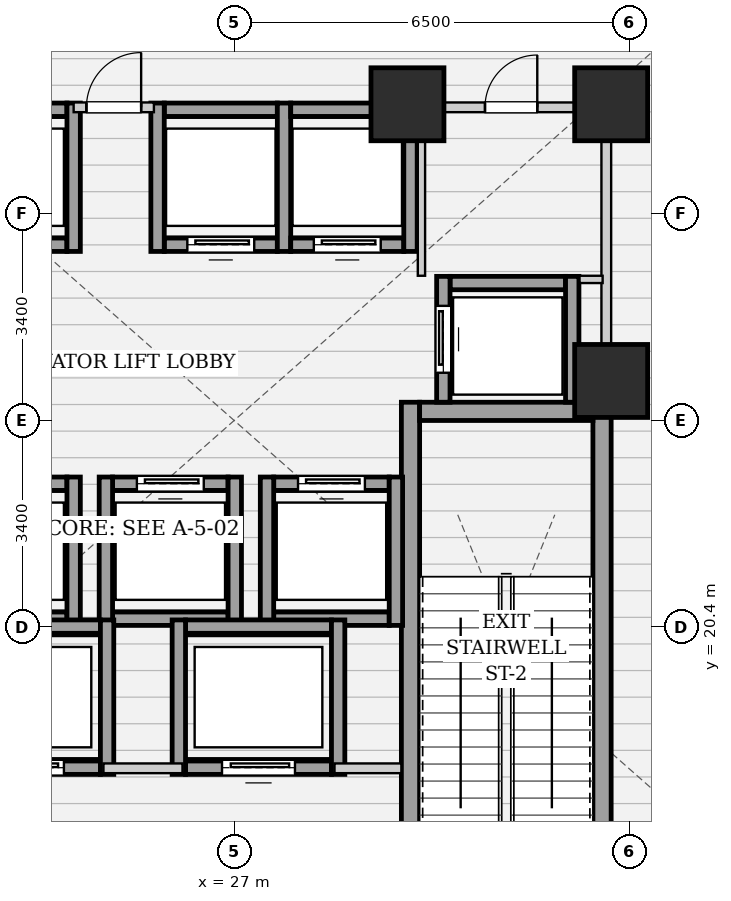
"""IFC4 building model, lengths in metres.
Left out: names, types, materials, properties, quantities, classifications, styles, units other than length and angle.
Written with IfcOpenShell. Run it as: python <this file> out.ifc"""

import sys

from ifc_helpers import new_model, si_unit, direction, frame, frame_2d, origin, origin_2d, place, context, subcontext, project, spatial, rectangle, extrude, element, fill, save


model = new_model("IFC4")
c1 = context("Model", 3, precision=1e-05, world=origin(), true_north=direction((0.0, 1.0)))
c2 = subcontext(c1, "Body", "Model", "MODEL_VIEW")
j1 = project(units=[si_unit("LENGTHUNIT", "METRE"), si_unit("PLANEANGLEUNIT", "RADIAN")], contexts=[c1])
p1 = place(None, origin())
s1 = spatial("IfcSite", under=j1, at=p1, CompositionType="ELEMENT")
p2 = place(p1, origin())
s2 = spatial("IfcBuilding", under=s1, at=p2, CompositionType="ELEMENT")
p3 = place(p2, origin())
s3 = spatial("IfcBuildingStorey", under=s2, at=p3, CompositionType="ELEMENT", Elevation=0.0)
for number, where, z_axis, x_axis in (
    (1, (29.85, 29.0, 0.0), (0.0, 0.0, 1.0), (1.0, 0.0, 0.0)),
    (2, (33.2, 29.0, 0.0), (0.0, 0.0, 1.0), (1.0, 0.0, 0.0)),
    (3, (33.2, 24.45, 0.0), (0.0, 0.0, 1.0), (1.0, 0.0, 0.0)),
):
    element("IfcColumn", number, at=place(p3, frame(where, z_axis=z_axis, x_axis=x_axis)), inside=s3, PredefinedType="COLUMN", context=c2, shape_type="SweptSolid", body=[
        extrude(rectangle(XDim=1.2, YDim=1.2, at=origin_2d()), origin(), (0.0, 0.0, 1.0), 6.0),
    ])
for number, where, z_axis, x_axis in (
    (4, (29.9, 15.1, 0.0), (0.0, 0.0, 1.0), (0.0, 1.0, 0.0)),
    (5, (33.05, 15.1, 0.0), (0.0, 0.0, 1.0), (0.0, 1.0, 0.0)),
):
    element("IfcWall", number, at=place(p3, frame(where, z_axis=z_axis, x_axis=x_axis)), inside=s3, PredefinedType="SHEAR", context=c2, shape_type="SweptSolid", body=[
        extrude(rectangle(XDim=9.0, YDim=0.3, at=frame_2d((4.5, 0.0))), origin(), (0.0, 0.0, 1.0), 5.68),
    ])
p4 = place(p3, frame((30.05, 23.95, 0.0), z_axis=(0.0, 0.0, 1.0), x_axis=(1.0, 0.0, 0.0)))
e6 = element("IfcWall", 6, at=p4, inside=s3, PredefinedType="SHEAR", context=c2, shape_type="SweptSolid", body=[
    extrude(rectangle(XDim=2.85, YDim=0.3, at=frame_2d((1.425, 0.0))), origin(), (0.0, 0.0, 1.0), 5.68),
])
p5 = place(p3, frame((22.35, 26.69, 0.0), z_axis=(0.0, 0.0, 1.0), x_axis=(1.0, 0.0, 0.0)))
e7 = element("IfcWall", 7, at=p5, inside=s3, PredefinedType="SHEAR", context=c2, shape_type="SweptSolid", body=[
    extrude(rectangle(XDim=1.9, YDim=0.22, at=frame_2d((0.95, 0.0))), origin(), (0.0, 0.0, 1.0), 5.68),
])
p6 = place(p5, frame((0.4, 0.0, 0.0)))
e8 = element("IfcOpeningElement", 8, at=p6, cuts=e7, PredefinedType="OPENING", context=c2, shape_type="SweptSolid", body=[
    extrude(rectangle(XDim=1.1, YDim=2.15, at=frame_2d((0.55, 1.075))), frame((0.0, 0.12, 0.0), z_axis=(0.0, -1.0, 0.0), x_axis=(1.0, 0.0, 0.0)), (0.0, 0.0, 1.0), 0.24),
])
p7 = place(p3, frame((22.35, 28.91, 0.0), z_axis=(0.0, 0.0, 1.0), x_axis=(1.0, 0.0, 0.0)))
e9 = element("IfcWall", 9, at=p7, inside=s3, PredefinedType="SHEAR", context=c2, shape_type="SweptSolid", body=[
    extrude(rectangle(XDim=1.9, YDim=0.22, at=frame_2d((0.95, 0.0))), origin(), (0.0, 0.0, 1.0), 5.68),
])
p8 = place(p3, frame((24.36, 26.58, 0.0), z_axis=(0.0, 0.0, 1.0), x_axis=(0.0, 1.0, 0.0)))
e10 = element("IfcWall", 10, at=p8, inside=s3, PredefinedType="SHEAR", context=c2, shape_type="SweptSolid", body=[
    extrude(rectangle(XDim=2.44, YDim=0.22, at=frame_2d((1.22, 0.0))), origin(), (0.0, 0.0, 1.0), 5.68),
])
p9 = place(p3, frame((25.85, 26.69, 0.0), z_axis=(0.0, 0.0, 1.0), x_axis=(1.0, 0.0, 0.0)))
e11 = element("IfcWall", 11, at=p9, inside=s3, PredefinedType="SHEAR", context=c2, shape_type="SweptSolid", body=[
    extrude(rectangle(XDim=1.86, YDim=0.22, at=frame_2d((0.93, 0.0))), origin(), (0.0, 0.0, 1.0), 5.68),
])
p10 = place(p9, frame((0.38, 0.0, 0.0)))
e12 = element("IfcOpeningElement", 12, at=p10, cuts=e11, PredefinedType="OPENING", context=c2, shape_type="SweptSolid", body=[
    extrude(rectangle(XDim=1.1, YDim=2.15, at=frame_2d((0.55, 1.075))), frame((0.0, 0.12, 0.0), z_axis=(0.0, -1.0, 0.0), x_axis=(1.0, 0.0, 0.0)), (0.0, 0.0, 1.0), 0.24),
])
p11 = place(p3, frame((25.85, 28.91, 0.0), z_axis=(0.0, 0.0, 1.0), x_axis=(1.0, 0.0, 0.0)))
e13 = element("IfcWall", 13, at=p11, inside=s3, PredefinedType="SHEAR", context=c2, shape_type="SweptSolid", body=[
    extrude(rectangle(XDim=1.86, YDim=0.22, at=frame_2d((0.93, 0.0))), origin(), (0.0, 0.0, 1.0), 5.68),
])
for number, where, z_axis, x_axis in (
    (14, (25.74, 26.58, 0.0), (0.0, 0.0, 1.0), (0.0, 1.0, 0.0)),
    (15, (27.82, 26.58, 0.0), (0.0, 0.0, 1.0), (0.0, 1.0, 0.0)),
):
    element("IfcWall", number, at=place(p3, frame(where, z_axis=z_axis, x_axis=x_axis)), inside=s3, PredefinedType="SHEAR", context=c2, shape_type="SweptSolid", body=[
        extrude(rectangle(XDim=2.44, YDim=0.22, at=frame_2d((1.22, 0.0))), origin(), (0.0, 0.0, 1.0), 5.68),
    ])
p12 = place(p3, frame((27.93, 26.69, 0.0), z_axis=(0.0, 0.0, 1.0), x_axis=(1.0, 0.0, 0.0)))
e16 = element("IfcWall", 16, at=p12, inside=s3, PredefinedType="SHEAR", context=c2, shape_type="SweptSolid", body=[
    extrude(rectangle(XDim=1.86, YDim=0.22, at=frame_2d((0.93, 0.0))), origin(), (0.0, 0.0, 1.0), 5.68),
])
p13 = place(p12, frame((0.38, 0.0, 0.0)))
e17 = element("IfcOpeningElement", 17, at=p13, cuts=e16, PredefinedType="OPENING", context=c2, shape_type="SweptSolid", body=[
    extrude(rectangle(XDim=1.1, YDim=2.15, at=frame_2d((0.55, 1.075))), frame((0.0, 0.12, 0.0), z_axis=(0.0, -1.0, 0.0), x_axis=(1.0, 0.0, 0.0)), (0.0, 0.0, 1.0), 0.24),
])
p14 = place(p3, frame((27.93, 28.91, 0.0), z_axis=(0.0, 0.0, 1.0), x_axis=(1.0, 0.0, 0.0)))
e18 = element("IfcWall", 18, at=p14, inside=s3, PredefinedType="SHEAR", context=c2, shape_type="SweptSolid", body=[
    extrude(rectangle(XDim=1.86, YDim=0.22, at=frame_2d((0.93, 0.0))), origin(), (0.0, 0.0, 1.0), 5.68),
])
p15 = place(p3, frame((29.9, 26.58, 0.0), z_axis=(0.0, 0.0, 1.0), x_axis=(0.0, 1.0, 0.0)))
e19 = element("IfcWall", 19, at=p15, inside=s3, PredefinedType="SHEAR", context=c2, shape_type="SweptSolid", body=[
    extrude(rectangle(XDim=2.44, YDim=0.22, at=frame_2d((1.22, 0.0))), origin(), (0.0, 0.0, 1.0), 5.68),
])
p16 = place(p3, frame((22.35, 20.54, 0.0), z_axis=(0.0, 0.0, 1.0), x_axis=(1.0, 0.0, 0.0)))
e20 = element("IfcWall", 20, at=p16, inside=s3, PredefinedType="SHEAR", context=c2, shape_type="SweptSolid", body=[
    extrude(rectangle(XDim=1.9, YDim=0.22, at=frame_2d((0.95, 0.0))), origin(), (0.0, 0.0, 1.0), 5.68),
])
p17 = place(p3, frame((22.35, 22.76, 0.0), z_axis=(0.0, 0.0, 1.0), x_axis=(1.0, 0.0, 0.0)))
e21 = element("IfcWall", 21, at=p17, inside=s3, PredefinedType="SHEAR", context=c2, shape_type="SweptSolid", body=[
    extrude(rectangle(XDim=1.9, YDim=0.22, at=frame_2d((0.95, 0.0))), origin(), (0.0, 0.0, 1.0), 5.68),
])
p18 = place(p17, frame((0.4, 0.0, 0.0)))
e22 = element("IfcOpeningElement", 22, at=p18, cuts=e21, PredefinedType="OPENING", context=c2, shape_type="SweptSolid", body=[
    extrude(rectangle(XDim=1.1, YDim=2.15, at=frame_2d((0.55, 1.075))), frame((0.0, 0.12, 0.0), z_axis=(0.0, -1.0, 0.0), x_axis=(1.0, 0.0, 0.0)), (0.0, 0.0, 1.0), 0.24),
])
p19 = place(p3, frame((24.36, 20.43, 0.0), z_axis=(0.0, 0.0, 1.0), x_axis=(0.0, 1.0, 0.0)))
e23 = element("IfcWall", 23, at=p19, inside=s3, PredefinedType="SHEAR", context=c2, shape_type="SweptSolid", body=[
    extrude(rectangle(XDim=2.44, YDim=0.22, at=frame_2d((1.22, 0.0))), origin(), (0.0, 0.0, 1.0), 5.68),
])
p20 = place(p3, frame((25.0, 20.54, 0.0), z_axis=(0.0, 0.0, 1.0), x_axis=(1.0, 0.0, 0.0)))
e24 = element("IfcWall", 24, at=p20, inside=s3, PredefinedType="SHEAR", context=c2, shape_type="SweptSolid", body=[
    extrude(rectangle(XDim=1.9, YDim=0.22, at=frame_2d((0.95, 0.0))), origin(), (0.0, 0.0, 1.0), 5.68),
])
p21 = place(p3, frame((25.0, 22.76, 0.0), z_axis=(0.0, 0.0, 1.0), x_axis=(1.0, 0.0, 0.0)))
e25 = element("IfcWall", 25, at=p21, inside=s3, PredefinedType="SHEAR", context=c2, shape_type="SweptSolid", body=[
    extrude(rectangle(XDim=1.9, YDim=0.22, at=frame_2d((0.95, 0.0))), origin(), (0.0, 0.0, 1.0), 5.68),
])
p22 = place(p21, frame((0.4, 0.0, 0.0)))
e26 = element("IfcOpeningElement", 26, at=p22, cuts=e25, PredefinedType="OPENING", context=c2, shape_type="SweptSolid", body=[
    extrude(rectangle(XDim=1.1, YDim=2.15, at=frame_2d((0.55, 1.075))), frame((0.0, 0.12, 0.0), z_axis=(0.0, -1.0, 0.0), x_axis=(1.0, 0.0, 0.0)), (0.0, 0.0, 1.0), 0.24),
])
for number, where, z_axis, x_axis in (
    (27, (24.89, 20.43, 0.0), (0.0, 0.0, 1.0), (0.0, 1.0, 0.0)),
    (28, (27.01, 20.43, 0.0), (0.0, 0.0, 1.0), (0.0, 1.0, 0.0)),
):
    element("IfcWall", number, at=place(p3, frame(where, z_axis=z_axis, x_axis=x_axis)), inside=s3, PredefinedType="SHEAR", context=c2, shape_type="SweptSolid", body=[
        extrude(rectangle(XDim=2.44, YDim=0.22, at=frame_2d((1.22, 0.0))), origin(), (0.0, 0.0, 1.0), 5.68),
    ])
p23 = place(p3, frame((27.65, 20.54, 0.0), z_axis=(0.0, 0.0, 1.0), x_axis=(1.0, 0.0, 0.0)))
e29 = element("IfcWall", 29, at=p23, inside=s3, PredefinedType="SHEAR", context=c2, shape_type="SweptSolid", body=[
    extrude(rectangle(XDim=1.9, YDim=0.22, at=frame_2d((0.95, 0.0))), origin(), (0.0, 0.0, 1.0), 5.68),
])
p24 = place(p3, frame((27.65, 22.76, 0.0), z_axis=(0.0, 0.0, 1.0), x_axis=(1.0, 0.0, 0.0)))
e30 = element("IfcWall", 30, at=p24, inside=s3, PredefinedType="SHEAR", context=c2, shape_type="SweptSolid", body=[
    extrude(rectangle(XDim=1.9, YDim=0.22, at=frame_2d((0.95, 0.0))), origin(), (0.0, 0.0, 1.0), 5.68),
])
p25 = place(p24, frame((0.4, 0.0, 0.0)))
e31 = element("IfcOpeningElement", 31, at=p25, cuts=e30, PredefinedType="OPENING", context=c2, shape_type="SweptSolid", body=[
    extrude(rectangle(XDim=1.1, YDim=2.15, at=frame_2d((0.55, 1.075))), frame((0.0, 0.12, 0.0), z_axis=(0.0, -1.0, 0.0), x_axis=(1.0, 0.0, 0.0)), (0.0, 0.0, 1.0), 0.24),
])
for number, where, z_axis, x_axis in (
    (32, (27.54, 20.43, 0.0), (0.0, 0.0, 1.0), (0.0, 1.0, 0.0)),
    (33, (29.66, 20.43, 0.0), (0.0, 0.0, 1.0), (0.0, 1.0, 0.0)),
):
    element("IfcWall", number, at=place(p3, frame(where, z_axis=z_axis, x_axis=x_axis)), inside=s3, PredefinedType="SHEAR", context=c2, shape_type="SweptSolid", body=[
        extrude(rectangle(XDim=2.44, YDim=0.22, at=frame_2d((1.22, 0.0))), origin(), (0.0, 0.0, 1.0), 5.68),
    ])
p26 = place(p3, frame((30.55, 26.06, 0.0), z_axis=(0.0, 0.0, 1.0), x_axis=(1.0, 0.0, 0.0)))
e34 = element("IfcWall", 34, at=p26, inside=s3, PredefinedType="SHEAR", context=c2, shape_type="SweptSolid", body=[
    extrude(rectangle(XDim=1.9, YDim=0.22, at=frame_2d((0.95, 0.0))), origin(), (0.0, 0.0, 1.0), 5.68),
])
p27 = place(p3, frame((30.44, 24.1, 0.0), z_axis=(0.0, 0.0, 1.0), x_axis=(0.0, 1.0, 0.0)))
e35 = element("IfcWall", 35, at=p27, inside=s3, PredefinedType="SHEAR", context=c2, shape_type="SweptSolid", body=[
    extrude(rectangle(XDim=2.07, YDim=0.22, at=frame_2d((1.035, 0.0))), origin(), (0.0, 0.0, 1.0), 5.68),
])
p28 = place(p27, frame((0.485, 0.0, 0.0)))
e36 = element("IfcOpeningElement", 36, at=p28, cuts=e35, PredefinedType="OPENING", context=c2, shape_type="SweptSolid", body=[
    extrude(rectangle(XDim=1.1, YDim=2.15, at=frame_2d((0.55, 1.075))), frame((0.0, 0.12, 0.0), z_axis=(0.0, -1.0, 0.0), x_axis=(1.0, 0.0, 0.0)), (0.0, 0.0, 1.0), 0.24),
])
p29 = place(p3, frame((32.56, 24.1, 0.0), z_axis=(0.0, 0.0, 1.0), x_axis=(0.0, 1.0, 0.0)))
e37 = element("IfcWall", 37, at=p29, inside=s3, PredefinedType="SHEAR", context=c2, shape_type="SweptSolid", body=[
    extrude(rectangle(XDim=2.07, YDim=0.22, at=frame_2d((1.035, 0.0))), origin(), (0.0, 0.0, 1.0), 5.68),
])
p30 = place(p3, frame((22.4, 18.09, 0.0), z_axis=(0.0, 0.0, 1.0), x_axis=(1.0, 0.0, 0.0)))
e38 = element("IfcWall", 38, at=p30, inside=s3, PredefinedType="SHEAR", context=c2, shape_type="SweptSolid", body=[
    extrude(rectangle(XDim=2.4, YDim=0.22, at=frame_2d((1.2, 0.0))), origin(), (0.0, 0.0, 1.0), 5.68),
])
p31 = place(p30, frame((0.6, 0.0, 0.0)))
e39 = element("IfcOpeningElement", 39, at=p31, cuts=e38, PredefinedType="OPENING", context=c2, shape_type="SweptSolid", body=[
    extrude(rectangle(XDim=1.2, YDim=2.15, at=frame_2d((0.6, 1.075))), frame((0.0, 0.12, 0.0), z_axis=(0.0, -1.0, 0.0), x_axis=(1.0, 0.0, 0.0)), (0.0, 0.0, 1.0), 0.24),
])
p32 = place(p3, frame((22.4, 20.41, 0.0), z_axis=(0.0, 0.0, 1.0), x_axis=(1.0, 0.0, 0.0)))
e40 = element("IfcWall", 40, at=p32, inside=s3, PredefinedType="SHEAR", context=c2, shape_type="SweptSolid", body=[
    extrude(rectangle(XDim=2.4, YDim=0.22, at=frame_2d((1.2, 0.0))), origin(), (0.0, 0.0, 1.0), 5.68),
])
p33 = place(p3, frame((24.91, 17.98, 0.0), z_axis=(0.0, 0.0, 1.0), x_axis=(0.0, 1.0, 0.0)))
e41 = element("IfcWall", 41, at=p33, inside=s3, PredefinedType="SHEAR", context=c2, shape_type="SweptSolid", body=[
    extrude(rectangle(XDim=2.54, YDim=0.22, at=frame_2d((1.27, 0.0))), origin(), (0.0, 0.0, 1.0), 5.68),
])
p34 = place(p3, frame((26.2, 18.09, 0.0), z_axis=(0.0, 0.0, 1.0), x_axis=(1.0, 0.0, 0.0)))
e42 = element("IfcWall", 42, at=p34, inside=s3, PredefinedType="SHEAR", context=c2, shape_type="SweptSolid", body=[
    extrude(rectangle(XDim=2.4, YDim=0.22, at=frame_2d((1.2, 0.0))), origin(), (0.0, 0.0, 1.0), 5.68),
])
p35 = place(p34, frame((0.6, 0.0, 0.0)))
e43 = element("IfcOpeningElement", 43, at=p35, cuts=e42, PredefinedType="OPENING", context=c2, shape_type="SweptSolid", body=[
    extrude(rectangle(XDim=1.2, YDim=2.15, at=frame_2d((0.6, 1.075))), frame((0.0, 0.12, 0.0), z_axis=(0.0, -1.0, 0.0), x_axis=(1.0, 0.0, 0.0)), (0.0, 0.0, 1.0), 0.24),
])
p36 = place(p3, frame((26.2, 20.41, 0.0), z_axis=(0.0, 0.0, 1.0), x_axis=(1.0, 0.0, 0.0)))
e44 = element("IfcWall", 44, at=p36, inside=s3, PredefinedType="SHEAR", context=c2, shape_type="SweptSolid", body=[
    extrude(rectangle(XDim=2.4, YDim=0.22, at=frame_2d((1.2, 0.0))), origin(), (0.0, 0.0, 1.0), 5.68),
])
for number, where, z_axis, x_axis in (
    (45, (26.09, 17.98, 0.0), (0.0, 0.0, 1.0), (0.0, 1.0, 0.0)),
    (46, (28.71, 17.98, 0.0), (0.0, 0.0, 1.0), (0.0, 1.0, 0.0)),
):
    element("IfcWall", number, at=place(p3, frame(where, z_axis=z_axis, x_axis=x_axis)), inside=s3, PredefinedType="SHEAR", context=c2, shape_type="SweptSolid", body=[
        extrude(rectangle(XDim=2.54, YDim=0.22, at=frame_2d((1.27, 0.0))), origin(), (0.0, 0.0, 1.0), 5.68),
    ])
p37 = place(p3, frame((24.85, 18.08, 0.0), z_axis=(0.0, 0.0, 1.0), x_axis=(1.0, 0.0, 0.0)))
e47 = element("IfcWall", 47, at=p37, inside=s3, PredefinedType="PARTITIONING", context=c2, shape_type="SweptSolid", body=[
    extrude(rectangle(XDim=1.3, YDim=0.16, at=frame_2d((0.65, 0.0))), origin(), (0.0, 0.0, 1.0), 5.68),
])
p38 = place(p3, frame((28.65, 18.08, 0.0), z_axis=(0.0, 0.0, 1.0), x_axis=(1.0, 0.0, 0.0)))
e48 = element("IfcWall", 48, at=p38, inside=s3, PredefinedType="PARTITIONING", context=c2, shape_type="SweptSolid", body=[
    extrude(rectangle(XDim=1.1, YDim=0.16, at=frame_2d((0.55, 0.0))), origin(), (0.0, 0.0, 1.0), 5.68),
])
p39 = place(p3, frame((33.12, 24.12, 0.0), z_axis=(0.0, 0.0, 1.0), x_axis=(0.0, 1.0, 0.0)))
e49 = element("IfcWall", 49, at=p39, inside=s3, PredefinedType="PARTITIONING", context=c2, shape_type="SweptSolid", body=[
    extrude(rectangle(XDim=4.76, YDim=0.16, at=frame_2d((2.38, 0.0))), origin(), (0.0, 0.0, 1.0), 5.68),
])
p40 = place(p3, frame((24.36, 28.95, 0.0), z_axis=(0.0, 0.0, 1.0), x_axis=(1.0, 0.0, 0.0)))
e50 = element("IfcWall", 50, at=p40, inside=s3, PredefinedType="PARTITIONING", context=c2, shape_type="SweptSolid", body=[
    extrude(rectangle(XDim=1.32, YDim=0.16, at=frame_2d((0.66, 0.0))), origin(), (0.0, 0.0, 1.0), 5.68),
])
p41 = place(p40, frame((0.21, 0.0, 0.0)))
e51 = element("IfcOpeningElement", 51, at=p41, cuts=e50, PredefinedType="OPENING", context=c2, shape_type="SweptSolid", body=[
    extrude(rectangle(XDim=0.9, YDim=2.05, at=frame_2d((0.45, 1.025))), frame((0.0, 0.09, 0.0), z_axis=(0.0, -1.0, 0.0), x_axis=(1.0, 0.0, 0.0)), (0.0, 0.0, 1.0), 0.18),
])
p42 = place(p3, frame((30.08, 26.18, 0.0), z_axis=(0.0, 0.0, 1.0), x_axis=(0.0, 1.0, 0.0)))
e52 = element("IfcWall", 52, at=p42, inside=s3, PredefinedType="PARTITIONING", context=c2, shape_type="SweptSolid", body=[
    extrude(rectangle(XDim=2.68, YDim=0.12, at=frame_2d((1.34, 0.0))), origin(), (0.0, 0.0, 1.0), 5.68),
])
p43 = place(p3, frame((32.68, 26.12, 0.0), z_axis=(0.0, 0.0, 1.0), x_axis=(1.0, 0.0, 0.0)))
e53 = element("IfcWall", 53, at=p43, inside=s3, PredefinedType="PARTITIONING", context=c2, shape_type="SweptSolid", body=[
    extrude(rectangle(XDim=0.38, YDim=0.12, at=frame_2d((0.19, 0.0))), origin(), (0.0, 0.0, 1.0), 5.68),
])
p44 = place(p3, frame((30.08, 28.95, 0.0), z_axis=(0.0, 0.0, 1.0), x_axis=(1.0, 0.0, 0.0)))
e54 = element("IfcWall", 54, at=p44, inside=s3, PredefinedType="PARTITIONING", context=c2, shape_type="SweptSolid", body=[
    extrude(rectangle(XDim=2.96, YDim=0.16, at=frame_2d((1.48, 0.0))), origin(), (0.0, 0.0, 1.0), 5.68),
])
p45 = place(p44, frame((1.045, 0.0, 0.0)))
e55 = element("IfcOpeningElement", 55, at=p45, cuts=e54, PredefinedType="OPENING", context=c2, shape_type="SweptSolid", body=[
    extrude(rectangle(XDim=0.86, YDim=2.05, at=frame_2d((0.43, 1.025))), frame((0.0, 0.09, 0.0), z_axis=(0.0, -1.0, 0.0), x_axis=(1.0, 0.0, 0.0)), (0.0, 0.0, 1.0), 0.18),
])
p46 = place(p10, origin())
e56 = element("IfcDoor", 56, at=p46, inside=s3, OperationType="SLIDING_TO_LEFT", PredefinedType="DOOR", context=c2, shape_type="SweptSolid", body=[
    extrude(rectangle(XDim=1.1, YDim=2.15, at=frame_2d((0.55, 1.075))), frame((0.0, 0.025, 0.0), z_axis=(0.0, -1.0, 0.0), x_axis=(1.0, 0.0, 0.0)), (0.0, 0.0, 1.0), 0.05),
])
fill(e12, e56)
p47 = place(p13, origin())
e57 = element("IfcDoor", 57, at=p47, inside=s3, OperationType="SLIDING_TO_LEFT", PredefinedType="DOOR", context=c2, shape_type="SweptSolid", body=[
    extrude(rectangle(XDim=1.1, YDim=2.15, at=frame_2d((0.55, 1.075))), frame((0.0, 0.025, 0.0), z_axis=(0.0, -1.0, 0.0), x_axis=(1.0, 0.0, 0.0)), (0.0, 0.0, 1.0), 0.05),
])
fill(e17, e57)
p48 = place(p22, origin())
e58 = element("IfcDoor", 58, at=p48, inside=s3, OperationType="SLIDING_TO_LEFT", PredefinedType="DOOR", context=c2, shape_type="SweptSolid", body=[
    extrude(rectangle(XDim=1.1, YDim=2.15, at=frame_2d((0.55, 1.075))), frame((0.0, 0.025, 0.0), z_axis=(0.0, -1.0, 0.0), x_axis=(1.0, 0.0, 0.0)), (0.0, 0.0, 1.0), 0.05),
])
fill(e26, e58)
p49 = place(p25, origin())
e59 = element("IfcDoor", 59, at=p49, inside=s3, OperationType="SLIDING_TO_LEFT", PredefinedType="DOOR", context=c2, shape_type="SweptSolid", body=[
    extrude(rectangle(XDim=1.1, YDim=2.15, at=frame_2d((0.55, 1.075))), frame((0.0, 0.025, 0.0), z_axis=(0.0, -1.0, 0.0), x_axis=(1.0, 0.0, 0.0)), (0.0, 0.0, 1.0), 0.05),
])
fill(e31, e59)
p50 = place(p28, origin())
e60 = element("IfcDoor", 60, at=p50, inside=s3, OperationType="SLIDING_TO_LEFT", PredefinedType="DOOR", context=c2, shape_type="SweptSolid", body=[
    extrude(rectangle(XDim=1.1, YDim=2.15, at=frame_2d((0.55, 1.075))), frame((0.0, 0.025, 0.0), z_axis=(0.0, -1.0, 0.0), x_axis=(1.0, 0.0, 0.0)), (0.0, 0.0, 1.0), 0.05),
])
fill(e36, e60)
p51 = place(p31, origin())
e61 = element("IfcDoor", 61, at=p51, inside=s3, OperationType="SLIDING_TO_LEFT", PredefinedType="DOOR", context=c2, shape_type="SweptSolid", body=[
    extrude(rectangle(XDim=1.2, YDim=2.15, at=frame_2d((0.6, 1.075))), frame((0.0, 0.025, 0.0), z_axis=(0.0, -1.0, 0.0), x_axis=(1.0, 0.0, 0.0)), (0.0, 0.0, 1.0), 0.05),
])
fill(e39, e61)
p52 = place(p35, origin())
e62 = element("IfcDoor", 62, at=p52, inside=s3, OperationType="SLIDING_TO_LEFT", PredefinedType="DOOR", context=c2, shape_type="SweptSolid", body=[
    extrude(rectangle(XDim=1.2, YDim=2.15, at=frame_2d((0.6, 1.075))), frame((0.0, 0.025, 0.0), z_axis=(0.0, -1.0, 0.0), x_axis=(1.0, 0.0, 0.0)), (0.0, 0.0, 1.0), 0.05),
])
fill(e43, e62)
p53 = place(p41, origin())
e63 = element("IfcDoor", 63, at=p53, inside=s3, OperationType="SINGLE_SWING_RIGHT", PredefinedType="DOOR", context=c2, shape_type="SweptSolid", body=[
    extrude(rectangle(XDim=0.9, YDim=2.05, at=frame_2d((0.45, 1.025))), frame((0.0, 0.025, 0.0), z_axis=(0.0, -1.0, 0.0), x_axis=(1.0, 0.0, 0.0)), (0.0, 0.0, 1.0), 0.05),
])
fill(e51, e63)
p54 = place(p45, origin())
e64 = element("IfcDoor", 64, at=p54, inside=s3, OperationType="SINGLE_SWING_RIGHT", PredefinedType="DOOR", context=c2, shape_type="SweptSolid", body=[
    extrude(rectangle(XDim=0.86, YDim=2.05, at=frame_2d((0.43, 1.025))), frame((0.0, 0.025, 0.0), z_axis=(0.0, -1.0, 0.0), x_axis=(1.0, 0.0, 0.0)), (0.0, 0.0, 1.0), 0.05),
])
fill(e55, e64)
save(model, sys.argv[1])
